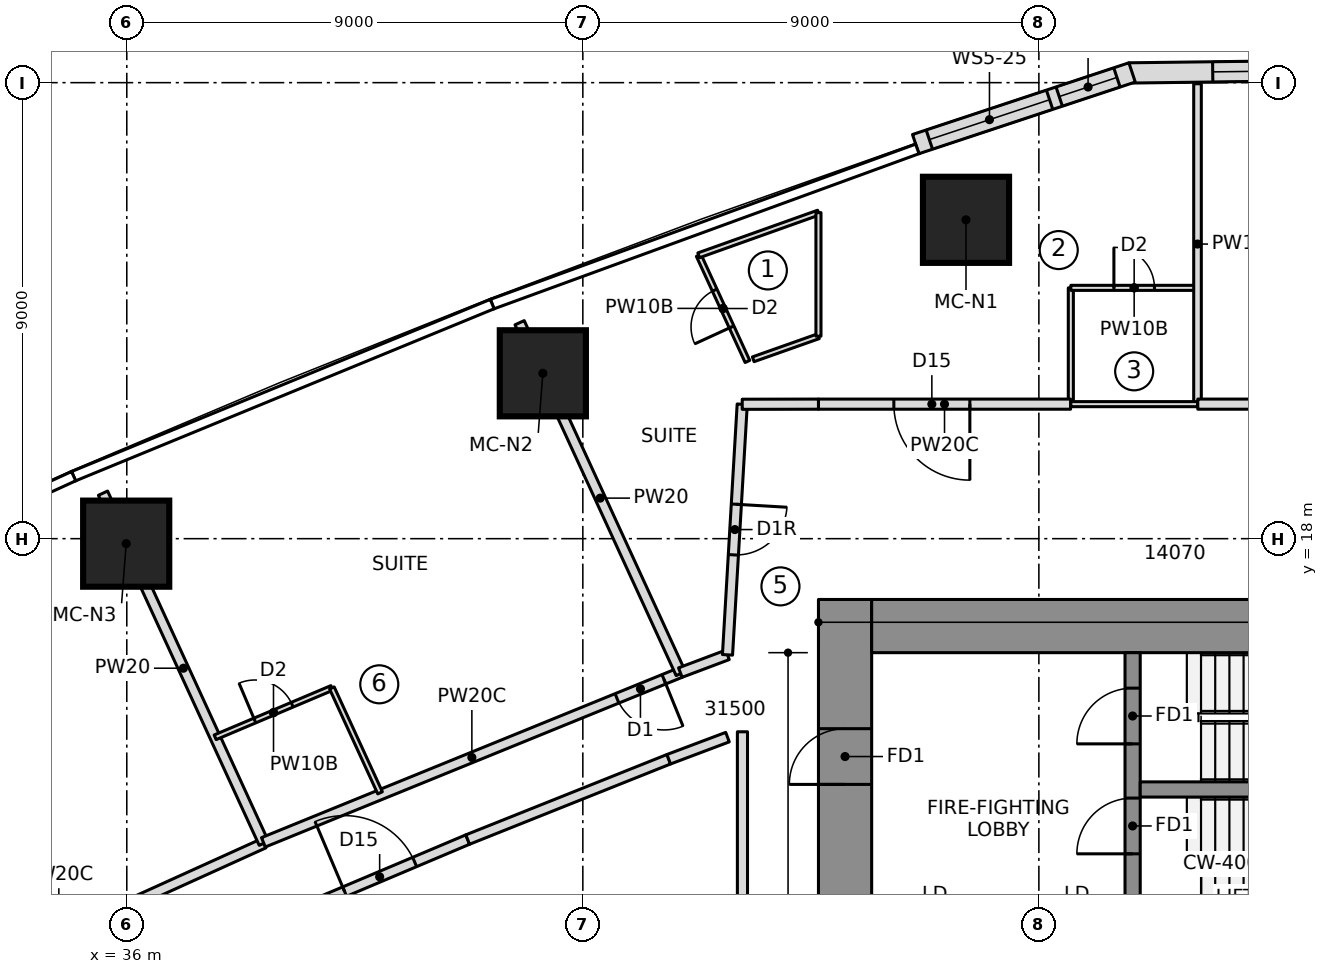
"""IFC4 building model, lengths in metres.
Left out: names, types, materials, properties, quantities, classifications, styles, units other than length and angle.
Written with IfcOpenShell. Run it as: python <this file> out.ifc"""

import sys

from ifc_helpers import new_model, si_unit, direction, frame, frame_2d, origin, origin_2d, place, context, subcontext, project, spatial, polyline, rectangle, outline, extrude, element, fill, save


model = new_model("IFC4")
c1 = context("Model", 3, precision=1e-05, world=origin(), true_north=direction((0.0, 1.0)))
c2 = subcontext(c1, "Body", "Model", "MODEL_VIEW")
j1 = project(units=[si_unit("LENGTHUNIT", "METRE"), si_unit("PLANEANGLEUNIT", "RADIAN")], contexts=[c1])
p1 = place(None, origin())
s1 = spatial("IfcSite", under=j1, at=p1, CompositionType="ELEMENT")
p2 = place(p1, origin())
s2 = spatial("IfcBuilding", under=s1, at=p2, CompositionType="ELEMENT")
p3 = place(p2, frame((0.0, 0.0, 113.3)))
s3 = spatial("IfcBuildingStorey", under=s2, at=p3, CompositionType="ELEMENT", Elevation=113.3)
p4 = place(p3, frame((50.175, 6.65, 0.0), z_axis=(0.0, 0.0, 1.0), x_axis=(0.0, 1.0, 0.0)))
e1 = element("IfcWall", 1, at=p4, inside=s3, PredefinedType="SHEAR", context=c2, shape_type="SweptSolid", body=[
    extrude(rectangle(XDim=10.15, YDim=1.05, at=frame_2d((5.075, 0.0))), origin(), (0.0, 0.0, 1.0), 3.55),
])
p5 = place(p4, frame((6.5, 0.0, 0.0)))
e2 = element("IfcOpeningElement", 2, at=p5, cuts=e1, PredefinedType="OPENING", context=c2, shape_type="SweptSolid", body=[
    extrude(rectangle(XDim=1.1, YDim=2.1, at=frame_2d((0.55, 1.05))), frame((0.0, 0.535, 0.0), z_axis=(0.0, -1.0, 0.0), x_axis=(1.0, 0.0, 0.0)), (0.0, 0.0, 1.0), 1.07),
])
p6 = place(p3, frame((50.7, 16.275, 0.0), z_axis=(0.0, 0.0, 1.0), x_axis=(1.0, 0.0, 0.0)))
e3 = element("IfcWall", 3, at=p6, inside=s3, PredefinedType="SHEAR", context=c2, shape_type="SweptSolid", body=[
    extrude(rectangle(XDim=14.07, YDim=1.05, at=frame_2d((7.035, 0.0))), origin(), (0.0, 0.0, 1.0), 3.55),
])
p7 = place(p3, frame((55.85, 10.35, 0.0), z_axis=(0.0, 0.0, 1.0), x_axis=(0.0, 1.0, 0.0)))
e4 = element("IfcWall", 4, at=p7, inside=s3, PredefinedType="SHEAR", context=c2, shape_type="SweptSolid", body=[
    extrude(rectangle(XDim=5.4, YDim=0.3, at=frame_2d((2.7, 0.0))), origin(), (0.0, 0.0, 1.0), 3.55),
])
p8 = place(p7, frame((1.43, 0.0, 0.0)))
e5 = element("IfcOpeningElement", 5, at=p8, cuts=e4, PredefinedType="OPENING", context=c2, shape_type="SweptSolid", body=[
    extrude(rectangle(XDim=1.1, YDim=2.1, at=frame_2d((0.55, 1.05))), frame((0.0, 0.16, 0.0), z_axis=(0.0, -1.0, 0.0), x_axis=(1.0, 0.0, 0.0)), (0.0, 0.0, 1.0), 0.32),
])
p9 = place(p7, frame((3.6, 0.0, 0.0)))
e6 = element("IfcOpeningElement", 6, at=p9, cuts=e4, PredefinedType="OPENING", context=c2, shape_type="SweptSolid", body=[
    extrude(rectangle(XDim=1.1, YDim=2.1, at=frame_2d((0.55, 1.05))), frame((0.0, 0.16, 0.0), z_axis=(0.0, -1.0, 0.0), x_axis=(1.0, 0.0, 0.0)), (0.0, 0.0, 1.0), 0.32),
])
p10 = place(p3, frame((56.0, 13.05, 0.0), z_axis=(0.0, 0.0, 1.0), x_axis=(1.0, 0.0, 0.0)))
e7 = element("IfcWall", 7, at=p10, inside=s3, PredefinedType="SHEAR", context=c2, shape_type="SweptSolid", body=[
    extrude(rectangle(XDim=7.72, YDim=0.3, at=frame_2d((3.86, 0.0))), origin(), (0.0, 0.0, 1.0), 3.55),
])
for number, where, z_axis, x_axis in (
    (8, (52.562, 24.293, 0.0), (0.0, 0.0, 1.0), (1.0, 0.0, 0.0)),
    (9, (44.211, 21.264, 0.0), (0.0, 0.0, 1.0), (1.0, 0.0, 0.0)),
    (10, (35.988, 17.902, 0.0), (0.0, 0.0, 1.0), (1.0, 0.0, 0.0)),
):
    element("IfcColumn", number, at=place(p3, frame(where, z_axis=z_axis, x_axis=x_axis)), inside=s3, PredefinedType="COLUMN", context=c2, shape_type="SweptSolid", body=[
        extrude(rectangle(XDim=1.7, YDim=1.7, at=origin_2d()), origin(), (0.0, 0.0, 1.0), 3.55),
    ])
p11 = place(p3, frame((60.049, 27.246, 0.0), z_axis=(0.0, 0.0, 1.0), x_axis=(-0.999919718849, -0.012671063772, 0.0)))
e11 = element("IfcWall", 11, at=p11, inside=s3, PredefinedType="NOTDEFINED", context=c2, shape_type="SweptSolid", body=[
    extrude(outline(polyline([(-0.061, -0.2), (4.27, -0.2), (4.208, 0.2), (0.061, 0.2), (-0.061, -0.2)])), origin(), (0.0, 0.0, 1.0), 3.25),
])
p12 = place(p11, frame((0.418, 0.0, 0.6)))
e12 = element("IfcOpeningElement", 12, at=p12, cuts=e11, PredefinedType="OPENING", context=c2, shape_type="SweptSolid", body=[
    extrude(outline(polyline([(0.0, 1.35), (0.084, 1.771), (0.322, 2.128), (0.679, 2.366), (1.1, 2.45), (1.521, 2.366), (1.878, 2.128), (2.116, 1.771), (2.2, 1.35), (2.2, 1.1), (2.116, 0.679), (1.878, 0.322), (1.521, 0.084), (1.1, 0.0), (0.679, 0.084), (0.322, 0.322), (0.084, 0.679), (0.0, 1.1), (0.0, 1.35)])), frame((0.0, 0.21, 0.0), z_axis=(0.0, -1.0, 0.0), x_axis=(1.0, 0.0, 0.0)), (0.0, 0.0, 1.0), 0.42),
])
p13 = place(p3, frame((55.81, 27.192, 0.0), z_axis=(0.0, 0.0, 1.0), x_axis=(-0.94925004851, -0.314522408429, 0.0)))
e13 = element("IfcWall", 13, at=p13, inside=s3, PredefinedType="NOTDEFINED", context=c2, shape_type="SweptSolid", body=[
    extrude(outline(polyline([(-0.031, -0.2), (4.468, -0.2), (4.468, 0.2), (0.031, 0.2), (-0.031, -0.2)])), origin(), (0.0, 0.0, 1.0), 3.25),
])
p14 = place(p13, frame((0.284, 0.0, 0.9)))
e14 = element("IfcOpeningElement", 14, at=p14, cuts=e13, PredefinedType="OPENING", context=c2, shape_type="SweptSolid", body=[
    extrude(rectangle(XDim=1.2, YDim=1.8, at=frame_2d((0.6, 0.9))), frame((0.0, 0.21, 0.0), z_axis=(0.0, -1.0, 0.0), x_axis=(1.0, 0.0, 0.0)), (0.0, 0.0, 1.0), 0.42),
])
p15 = place(p13, frame((1.684, 0.0, 0.9)))
e15 = element("IfcOpeningElement", 15, at=p15, cuts=e13, PredefinedType="OPENING", context=c2, shape_type="SweptSolid", body=[
    extrude(rectangle(XDim=2.5, YDim=1.8, at=frame_2d((1.25, 0.9))), frame((0.0, 0.21, 0.0), z_axis=(0.0, -1.0, 0.0), x_axis=(1.0, 0.0, 0.0)), (0.0, 0.0, 1.0), 0.42),
])
p16 = place(p3, frame((54.631, 20.65, 0.0), z_axis=(0.0, 0.0, 1.0), x_axis=(0.0, 1.0, 0.0)))
e16 = element("IfcWall", 16, at=p16, inside=s3, PredefinedType="PARTITIONING", context=c2, shape_type="SweptSolid", body=[
    extrude(rectangle(XDim=2.3, YDim=0.1, at=frame_2d((1.15, 0.0))), origin(), (0.0, 0.0, 1.0), 3.25),
])
p17 = place(p3, frame((54.631, 22.95, 0.0), z_axis=(0.0, 0.0, 1.0), x_axis=(1.0, 0.0, 0.0)))
e17 = element("IfcWall", 17, at=p17, inside=s3, PredefinedType="PARTITIONING", context=c2, shape_type="SweptSolid", body=[
    extrude(rectangle(XDim=2.5, YDim=0.1, at=frame_2d((1.25, 0.0))), origin(), (0.0, 0.0, 1.0), 3.25),
])
p18 = place(p17, frame((0.85, 0.0, 0.0)))
e18 = element("IfcOpeningElement", 18, at=p18, cuts=e17, PredefinedType="OPENING", context=c2, shape_type="SweptSolid", body=[
    extrude(rectangle(XDim=0.8, YDim=2.1, at=frame_2d((0.4, 1.05))), frame((0.0, 0.06, 0.0), z_axis=(0.0, -1.0, 0.0), x_axis=(1.0, 0.0, 0.0)), (0.0, 0.0, 1.0), 0.12),
])
p19 = place(p3, frame((57.131, 20.65, 0.0), z_axis=(0.0, 0.0, 1.0), x_axis=(0.0, 1.0, 0.0)))
e19 = element("IfcWall", 19, at=p19, inside=s3, PredefinedType="PARTITIONING", context=c2, shape_type="SweptSolid", body=[
    extrude(rectangle(XDim=6.329, YDim=0.15, at=frame_2d((3.165, 0.0))), origin(), (0.0, 0.0, 1.0), 3.25),
])
p20 = place(p3, frame((30.614, 8.32, 0.0), z_axis=(0.0, 0.0, 1.0), x_axis=(0.910751030363, 0.41295588226, 0.0)))
e20 = element("IfcWall", 20, at=p20, inside=s3, PredefinedType="PARTITIONING", context=c2, shape_type="SweptSolid", body=[
    extrude(rectangle(XDim=8.883, YDim=0.2, at=frame_2d((4.442, 0.0))), origin(), (0.0, 0.0, 1.0), 3.25),
])
p21 = place(p20, frame((0.45, 0.0, 0.0)))
e21 = element("IfcOpeningElement", 21, at=p21, cuts=e20, PredefinedType="OPENING", context=c2, shape_type="SweptSolid", body=[
    extrude(rectangle(XDim=1.0, YDim=2.1, at=frame_2d((0.5, 1.05))), frame((0.0, 0.11, 0.0), z_axis=(0.0, -1.0, 0.0), x_axis=(1.0, 0.0, 0.0)), (0.0, 0.0, 1.0), 0.22),
])
p22 = place(p3, frame((38.704, 11.989, 0.0), z_axis=(0.0, 0.0, 1.0), x_axis=(-0.417416334044, 0.908715359215, 0.0)))
e22 = element("IfcWall", 22, at=p22, inside=s3, PredefinedType="PARTITIONING", context=c2, shape_type="SweptSolid", body=[
    extrude(rectangle(XDim=7.604, YDim=0.2, at=frame_2d((3.802, 0.0))), origin(), (0.0, 0.0, 1.0), 3.25),
])
p23 = place(p3, frame((46.924, 15.357, 0.0), z_axis=(0.0, 0.0, 1.0), x_axis=(-0.926186929429, -0.377064678477, 0.0)))
e23 = element("IfcWall", 23, at=p23, inside=s3, PredefinedType="PARTITIONING", context=c2, shape_type="SweptSolid", body=[
    extrude(rectangle(XDim=8.884, YDim=0.2, at=frame_2d((4.442, 0.0))), origin(), (0.0, 0.0, 1.0), 3.25),
])
p24 = place(p23, frame((0.35, 0.0, 0.0)))
e24 = element("IfcOpeningElement", 24, at=p24, cuts=e23, PredefinedType="OPENING", context=c2, shape_type="SweptSolid", body=[
    extrude(rectangle(XDim=1.0, YDim=2.1, at=frame_2d((0.5, 1.05))), frame((0.0, 0.11, 0.0), z_axis=(0.0, -1.0, 0.0), x_axis=(1.0, 0.0, 0.0)), (0.0, 0.0, 1.0), 0.22),
])
p25 = place(p3, frame((37.744, 14.08, 0.0), z_axis=(0.0, 0.0, 1.0), x_axis=(0.921042675983, 0.38946166566, 0.0)))
e25 = element("IfcWall", 25, at=p25, inside=s3, PredefinedType="PARTITIONING", context=c2, shape_type="SweptSolid", body=[
    extrude(rectangle(XDim=2.501, YDim=0.1, at=frame_2d((1.25, 0.0))), origin(), (0.0, 0.0, 1.0), 3.25),
])
p26 = place(p25, frame((0.85, 0.0, 0.0)))
e26 = element("IfcOpeningElement", 26, at=p26, cuts=e25, PredefinedType="OPENING", context=c2, shape_type="SweptSolid", body=[
    extrude(rectangle(XDim=0.8, YDim=2.1, at=frame_2d((0.4, 1.05))), frame((0.0, 0.06, 0.0), z_axis=(0.0, -1.0, 0.0), x_axis=(1.0, 0.0, 0.0)), (0.0, 0.0, 1.0), 0.12),
])
p27 = place(p3, frame((40.048, 15.054, 0.0), z_axis=(0.0, 0.0, 1.0), x_axis=(0.417433204355, -0.908707609686, 0.0)))
e27 = element("IfcWall", 27, at=p27, inside=s3, PredefinedType="PARTITIONING", context=c2, shape_type="SweptSolid", body=[
    extrude(rectangle(XDim=2.278, YDim=0.1, at=frame_2d((1.139, 0.0))), origin(), (0.0, 0.0, 1.0), 3.25),
])
p28 = place(p3, frame((46.933, 15.339, 0.0), z_axis=(0.0, 0.0, 1.0), x_axis=(-0.417437957167, 0.908705426371, 0.0)))
e28 = element("IfcWall", 28, at=p28, inside=s3, PredefinedType="PARTITIONING", context=c2, shape_type="SweptSolid", body=[
    extrude(rectangle(XDim=7.619, YDim=0.2, at=frame_2d((3.81, 0.0))), origin(), (0.0, 0.0, 1.0), 3.25),
])
p29 = place(p3, frame((49.65, 21.996, 0.0), z_axis=(0.0, 0.0, 1.0), x_axis=(-0.942692856107, -0.333661773425, 0.0)))
e29 = element("IfcWall", 29, at=p29, inside=s3, PredefinedType="PARTITIONING", context=c2, shape_type="SweptSolid", body=[
    extrude(rectangle(XDim=1.365, YDim=0.1, at=frame_2d((0.683, 0.0))), origin(), (0.0, 0.0, 1.0), 3.25),
])
p30 = place(p3, frame((48.249, 21.497, 0.0), z_axis=(0.0, 0.0, 1.0), x_axis=(-0.41749308293, 0.908680100864, 0.0)))
e30 = element("IfcWall", 30, at=p30, inside=s3, PredefinedType="PARTITIONING", context=c2, shape_type="SweptSolid", body=[
    extrude(rectangle(XDim=2.306, YDim=0.1, at=frame_2d((1.153, 0.0))), origin(), (0.0, 0.0, 1.0), 3.25),
])
p31 = place(p30, frame((0.75, 0.0, 0.0)))
e31 = element("IfcOpeningElement", 31, at=p31, cuts=e30, PredefinedType="OPENING", context=c2, shape_type="SweptSolid", body=[
    extrude(rectangle(XDim=0.8, YDim=2.1, at=frame_2d((0.4, 1.05))), frame((0.0, 0.06, 0.0), z_axis=(0.0, -1.0, 0.0), x_axis=(1.0, 0.0, 0.0)), (0.0, 0.0, 1.0), 0.12),
])
p32 = place(p3, frame((38.792, 10.397, 0.0), z_axis=(0.0, 0.0, 1.0), x_axis=(0.921037415532, 0.389474105929, 0.0)))
e32 = element("IfcWall", 32, at=p32, inside=s3, PredefinedType="PARTITIONING", context=c2, shape_type="SweptSolid", body=[
    extrude(rectangle(XDim=4.273, YDim=0.2, at=frame_2d((2.137, 0.0))), origin(), (0.0, 0.0, 1.0), 3.25),
])
p33 = place(p32, frame((1.636, 0.0, 0.0)))
e33 = element("IfcOpeningElement", 33, at=p33, cuts=e32, PredefinedType="OPENING", context=c2, shape_type="SweptSolid", body=[
    extrude(rectangle(XDim=1.5, YDim=2.1, at=frame_2d((0.75, 1.05))), frame((0.0, 0.11, 0.0), z_axis=(0.0, -1.0, 0.0), x_axis=(1.0, 0.0, 0.0)), (0.0, 0.0, 1.0), 0.22),
])
p34 = place(p3, frame((42.728, 12.062, 0.0), z_axis=(0.0, 0.0, 1.0), x_axis=(0.928638161177, 0.370986745864, 0.0)))
e34 = element("IfcWall", 34, at=p34, inside=s3, PredefinedType="PARTITIONING", context=c2, shape_type="SweptSolid", body=[
    extrude(rectangle(XDim=4.273, YDim=0.2, at=frame_2d((2.136, 0.0))), origin(), (0.0, 0.0, 1.0), 3.25),
])
p35 = place(p3, frame((54.625, 20.655, 0.0), z_axis=(0.0, 0.0, 1.0), x_axis=(-1.0, 0.0, 0.0)))
e35 = element("IfcWall", 35, at=p35, inside=s3, PredefinedType="PARTITIONING", context=c2, shape_type="SweptSolid", body=[
    extrude(rectangle(XDim=4.976, YDim=0.2, at=frame_2d((2.488, 0.0))), origin(), (0.0, 0.0, 1.0), 3.25),
])
p36 = place(p35, frame((1.988, 0.0, 0.0)))
e36 = element("IfcOpeningElement", 36, at=p36, cuts=e35, PredefinedType="OPENING", context=c2, shape_type="SweptSolid", body=[
    extrude(rectangle(XDim=1.5, YDim=2.1, at=frame_2d((0.75, 1.05))), frame((0.0, 0.11, 0.0), z_axis=(0.0, -1.0, 0.0), x_axis=(1.0, 0.0, 0.0)), (0.0, 0.0, 1.0), 0.22),
])
p37 = place(p3, frame((62.106, 20.655, 0.0), z_axis=(0.0, 0.0, 1.0), x_axis=(-1.0, 0.0, 0.0)))
e37 = element("IfcWall", 37, at=p37, inside=s3, PredefinedType="PARTITIONING", context=c2, shape_type="SweptSolid", body=[
    extrude(rectangle(XDim=4.971, YDim=0.2, at=frame_2d((2.485, 0.0))), origin(), (0.0, 0.0, 1.0), 3.25),
])
p38 = place(p37, frame((1.985, 0.0, 0.0)))
e38 = element("IfcOpeningElement", 38, at=p38, cuts=e37, PredefinedType="OPENING", context=c2, shape_type="SweptSolid", body=[
    extrude(rectangle(XDim=1.0, YDim=2.1, at=frame_2d((0.5, 1.05))), frame((0.0, 0.11, 0.0), z_axis=(0.0, -1.0, 0.0), x_axis=(1.0, 0.0, 0.0)), (0.0, 0.0, 1.0), 0.22),
])
p39 = place(p3, frame((57.131, 20.655, 0.0), z_axis=(0.0, 0.0, 1.0), x_axis=(-1.0, 0.0, 0.0)))
e39 = element("IfcWall", 39, at=p39, inside=s3, PredefinedType="PARTITIONING", context=c2, shape_type="SweptSolid", body=[
    extrude(rectangle(XDim=2.5, YDim=0.1, at=frame_2d((1.25, 0.0))), origin(), (0.0, 0.0, 1.0), 3.25),
])
p40 = place(p3, frame((47.286, 23.592, 0.0), z_axis=(0.0, 0.0, 1.0), x_axis=(0.941933231826, 0.335800218555, 0.0)))
e40 = element("IfcWall", 40, at=p40, inside=s3, PredefinedType="PARTITIONING", context=c2, shape_type="SweptSolid", body=[
    extrude(rectangle(XDim=2.51, YDim=0.1, at=frame_2d((1.255, 0.0))), origin(), (0.0, 0.0, 1.0), 3.25),
])
p41 = place(p3, frame((49.65, 24.435, 0.0), z_axis=(0.0, 0.0, 1.0), x_axis=(0.0, -1.0, 0.0)))
e41 = element("IfcWall", 41, at=p41, inside=s3, PredefinedType="PARTITIONING", context=c2, shape_type="SweptSolid", body=[
    extrude(rectangle(XDim=2.439, YDim=0.1, at=frame_2d((1.22, 0.0))), origin(), (0.0, 0.0, 1.0), 3.25),
])
p42 = place(p3, frame((47.855, 15.707, 0.0), z_axis=(0.0, 0.0, 1.0), x_axis=(-0.935803526171, -0.35252199989, 0.0)))
e42 = element("IfcWall", 42, at=p42, inside=s3, PredefinedType="PARTITIONING", context=c2, shape_type="SweptSolid", body=[
    extrude(rectangle(XDim=0.995, YDim=0.2, at=frame_2d((0.497, 0.0))), origin(), (0.0, 0.0, 1.0), 3.25),
])
p43 = place(p3, frame((46.696, 13.647, 0.0), z_axis=(0.0, 0.0, 1.0), x_axis=(0.935907269358, 0.352246480696, 0.0)))
e43 = element("IfcWall", 43, at=p43, inside=s3, PredefinedType="PARTITIONING", context=c2, shape_type="SweptSolid", body=[
    extrude(rectangle(XDim=1.239, YDim=0.2, at=frame_2d((0.619, 0.0))), origin(), (0.0, 0.0, 1.0), 3.25),
])
p44 = place(p3, frame((48.146, 20.652, 0.0), z_axis=(0.0, 0.0, 1.0), x_axis=(-0.058649792989, -0.998278619315, 0.0)))
e44 = element("IfcWall", 44, at=p44, inside=s3, PredefinedType="PARTITIONING", context=c2, shape_type="SweptSolid", body=[
    extrude(rectangle(XDim=4.954, YDim=0.2, at=frame_2d((2.477, 0.0))), origin(), (0.0, 0.0, 1.0), 3.25),
])
p45 = place(p44, frame((1.977, 0.0, 0.0)))
e45 = element("IfcOpeningElement", 45, at=p45, cuts=e44, PredefinedType="OPENING", context=c2, shape_type="SweptSolid", body=[
    extrude(rectangle(XDim=1.0, YDim=2.1, at=frame_2d((0.5, 1.05))), frame((0.0, 0.11, 0.0), z_axis=(0.0, -1.0, 0.0), x_axis=(1.0, 0.0, 0.0)), (0.0, 0.0, 1.0), 0.22),
])
p46 = place(p3, frame((48.15, 14.189, 0.0), z_axis=(0.0, 0.0, 1.0), x_axis=(0.0, -1.0, 0.0)))
e46 = element("IfcWall", 46, at=p46, inside=s3, PredefinedType="PARTITIONING", context=c2, shape_type="SweptSolid", body=[
    extrude(rectangle(XDim=28.377, YDim=0.2, at=frame_2d((14.189, 0.0))), origin(), (0.0, 0.0, 1.0), 3.25),
])
p47 = place(p3, frame((49.65, 20.655, 0.0), z_axis=(0.0, 0.0, 1.0), x_axis=(-0.999998406651, -0.001785131852, 0.0)))
e47 = element("IfcWall", 47, at=p47, inside=s3, PredefinedType="PARTITIONING", context=c2, shape_type="SweptSolid", body=[
    extrude(rectangle(XDim=1.504, YDim=0.2, at=frame_2d((0.752, 0.0))), origin(), (0.0, 0.0, 1.0), 3.25),
])
p48 = place(p12, origin())
e48 = element("IfcWindow", 48, at=p48, inside=s3, PartitioningType="SINGLE_PANEL", PredefinedType="WINDOW", context=c2, shape_type="SweptSolid", body=[
    extrude(outline(polyline([(0.0, 1.35), (0.084, 1.771), (0.322, 2.128), (0.679, 2.366), (1.1, 2.45), (1.521, 2.366), (1.878, 2.128), (2.116, 1.771), (2.2, 1.35), (2.2, 1.1), (2.116, 0.679), (1.878, 0.322), (1.521, 0.084), (1.1, 0.0), (0.679, 0.084), (0.322, 0.322), (0.084, 0.679), (0.0, 1.1), (0.0, 1.35)])), frame((0.0, 0.17, 0.0), z_axis=(0.0, -1.0, 0.0), x_axis=(1.0, 0.0, 0.0)), (0.0, 0.0, 1.0), 0.06),
])
fill(e12, e48)
p49 = place(p14, origin())
e49 = element("IfcWindow", 49, at=p49, inside=s3, PartitioningType="SINGLE_PANEL", PredefinedType="WINDOW", context=c2, shape_type="SweptSolid", body=[
    extrude(rectangle(XDim=1.2, YDim=1.8, at=frame_2d((0.6, 0.9))), frame((0.0, 0.17, 0.0), z_axis=(0.0, -1.0, 0.0), x_axis=(1.0, 0.0, 0.0)), (0.0, 0.0, 1.0), 0.06),
])
fill(e14, e49)
p50 = place(p15, origin())
e50 = element("IfcWindow", 50, at=p50, inside=s3, PartitioningType="SINGLE_PANEL", PredefinedType="WINDOW", context=c2, shape_type="SweptSolid", body=[
    extrude(rectangle(XDim=2.5, YDim=1.8, at=frame_2d((1.25, 0.9))), frame((0.0, 0.17, 0.0), z_axis=(0.0, -1.0, 0.0), x_axis=(1.0, 0.0, 0.0)), (0.0, 0.0, 1.0), 0.06),
])
fill(e15, e50)
p51 = place(p18, origin())
e51 = element("IfcDoor", 51, at=p51, inside=s3, OperationType="SINGLE_SWING_LEFT", PredefinedType="DOOR", context=c2, shape_type="SweptSolid", body=[
    extrude(rectangle(XDim=0.8, YDim=2.1, at=frame_2d((0.4, 1.05))), frame((0.0, 0.025, 0.0), z_axis=(0.0, -1.0, 0.0), x_axis=(1.0, 0.0, 0.0)), (0.0, 0.0, 1.0), 0.05),
])
fill(e18, e51)
p52 = place(p26, origin())
e52 = element("IfcDoor", 52, at=p52, inside=s3, OperationType="SINGLE_SWING_LEFT", PredefinedType="DOOR", context=c2, shape_type="SweptSolid", body=[
    extrude(rectangle(XDim=0.8, YDim=2.1, at=frame_2d((0.4, 1.05))), frame((0.0, 0.025, 0.0), z_axis=(0.0, -1.0, 0.0), x_axis=(1.0, 0.0, 0.0)), (0.0, 0.0, 1.0), 0.05),
])
fill(e26, e52)
p53 = place(p24, origin())
e53 = element("IfcDoor", 53, at=p53, inside=s3, OperationType="SINGLE_SWING_LEFT", PredefinedType="DOOR", context=c2, shape_type="SweptSolid", body=[
    extrude(rectangle(XDim=1.0, YDim=2.1, at=frame_2d((0.5, 1.05))), frame((0.0, 0.025, 0.0), z_axis=(0.0, -1.0, 0.0), x_axis=(1.0, 0.0, 0.0)), (0.0, 0.0, 1.0), 0.05),
])
fill(e24, e53)
p54 = place(p31, origin())
e54 = element("IfcDoor", 54, at=p54, inside=s3, OperationType="SINGLE_SWING_LEFT", PredefinedType="DOOR", context=c2, shape_type="SweptSolid", body=[
    extrude(rectangle(XDim=0.8, YDim=2.1, at=frame_2d((0.4, 1.05))), frame((0.0, 0.025, 0.0), z_axis=(0.0, -1.0, 0.0), x_axis=(1.0, 0.0, 0.0)), (0.0, 0.0, 1.0), 0.05),
])
fill(e31, e54)
p55 = place(p33, origin())
e55 = element("IfcDoor", 55, at=p55, inside=s3, OperationType="DOUBLE_DOOR_SINGLE_SWING", PredefinedType="DOOR", context=c2, shape_type="SweptSolid", body=[
    extrude(rectangle(XDim=1.5, YDim=2.1, at=frame_2d((0.75, 1.05))), frame((0.0, 0.025, 0.0), z_axis=(0.0, -1.0, 0.0), x_axis=(1.0, 0.0, 0.0)), (0.0, 0.0, 1.0), 0.05),
])
fill(e33, e55)
p56 = place(p36, origin())
e56 = element("IfcDoor", 56, at=p56, inside=s3, OperationType="DOUBLE_DOOR_SINGLE_SWING", PredefinedType="DOOR", context=c2, shape_type="SweptSolid", body=[
    extrude(rectangle(XDim=1.5, YDim=2.1, at=frame_2d((0.75, 1.05))), frame((0.0, 0.025, 0.0), z_axis=(0.0, -1.0, 0.0), x_axis=(1.0, 0.0, 0.0)), (0.0, 0.0, 1.0), 0.05),
])
fill(e36, e56)
p57 = place(p45, origin())
e57 = element("IfcDoor", 57, at=p57, inside=s3, OperationType="SINGLE_SWING_RIGHT", PredefinedType="DOOR", context=c2, shape_type="SweptSolid", body=[
    extrude(rectangle(XDim=1.0, YDim=2.1, at=frame_2d((0.5, 1.05))), frame((0.0, 0.025, 0.0), z_axis=(0.0, -1.0, 0.0), x_axis=(1.0, 0.0, 0.0)), (0.0, 0.0, 1.0), 0.05),
])
fill(e45, e57)
p58 = place(p8, origin())
e58 = element("IfcDoor", 58, at=p58, inside=s3, OperationType="SINGLE_SWING_RIGHT", PredefinedType="DOOR", context=c2, shape_type="SweptSolid", body=[
    extrude(rectangle(XDim=1.1, YDim=2.1, at=frame_2d((0.55, 1.05))), frame((0.0, 0.025, 0.0), z_axis=(0.0, -1.0, 0.0), x_axis=(1.0, 0.0, 0.0)), (0.0, 0.0, 1.0), 0.05),
])
fill(e5, e58)
p59 = place(p9, origin())
e59 = element("IfcDoor", 59, at=p59, inside=s3, OperationType="SINGLE_SWING_RIGHT", PredefinedType="DOOR", context=c2, shape_type="SweptSolid", body=[
    extrude(rectangle(XDim=1.1, YDim=2.1, at=frame_2d((0.55, 1.05))), frame((0.0, 0.025, 0.0), z_axis=(0.0, -1.0, 0.0), x_axis=(1.0, 0.0, 0.0)), (0.0, 0.0, 1.0), 0.05),
])
fill(e6, e59)
p60 = place(p5, origin())
e60 = element("IfcDoor", 60, at=p60, inside=s3, OperationType="SINGLE_SWING_RIGHT", PredefinedType="DOOR", context=c2, shape_type="SweptSolid", body=[
    extrude(rectangle(XDim=1.1, YDim=2.1, at=frame_2d((0.55, 1.05))), frame((0.0, 0.025, 0.0), z_axis=(0.0, -1.0, 0.0), x_axis=(1.0, 0.0, 0.0)), (0.0, 0.0, 1.0), 0.05),
])
fill(e2, e60)
save(model, sys.argv[1])
